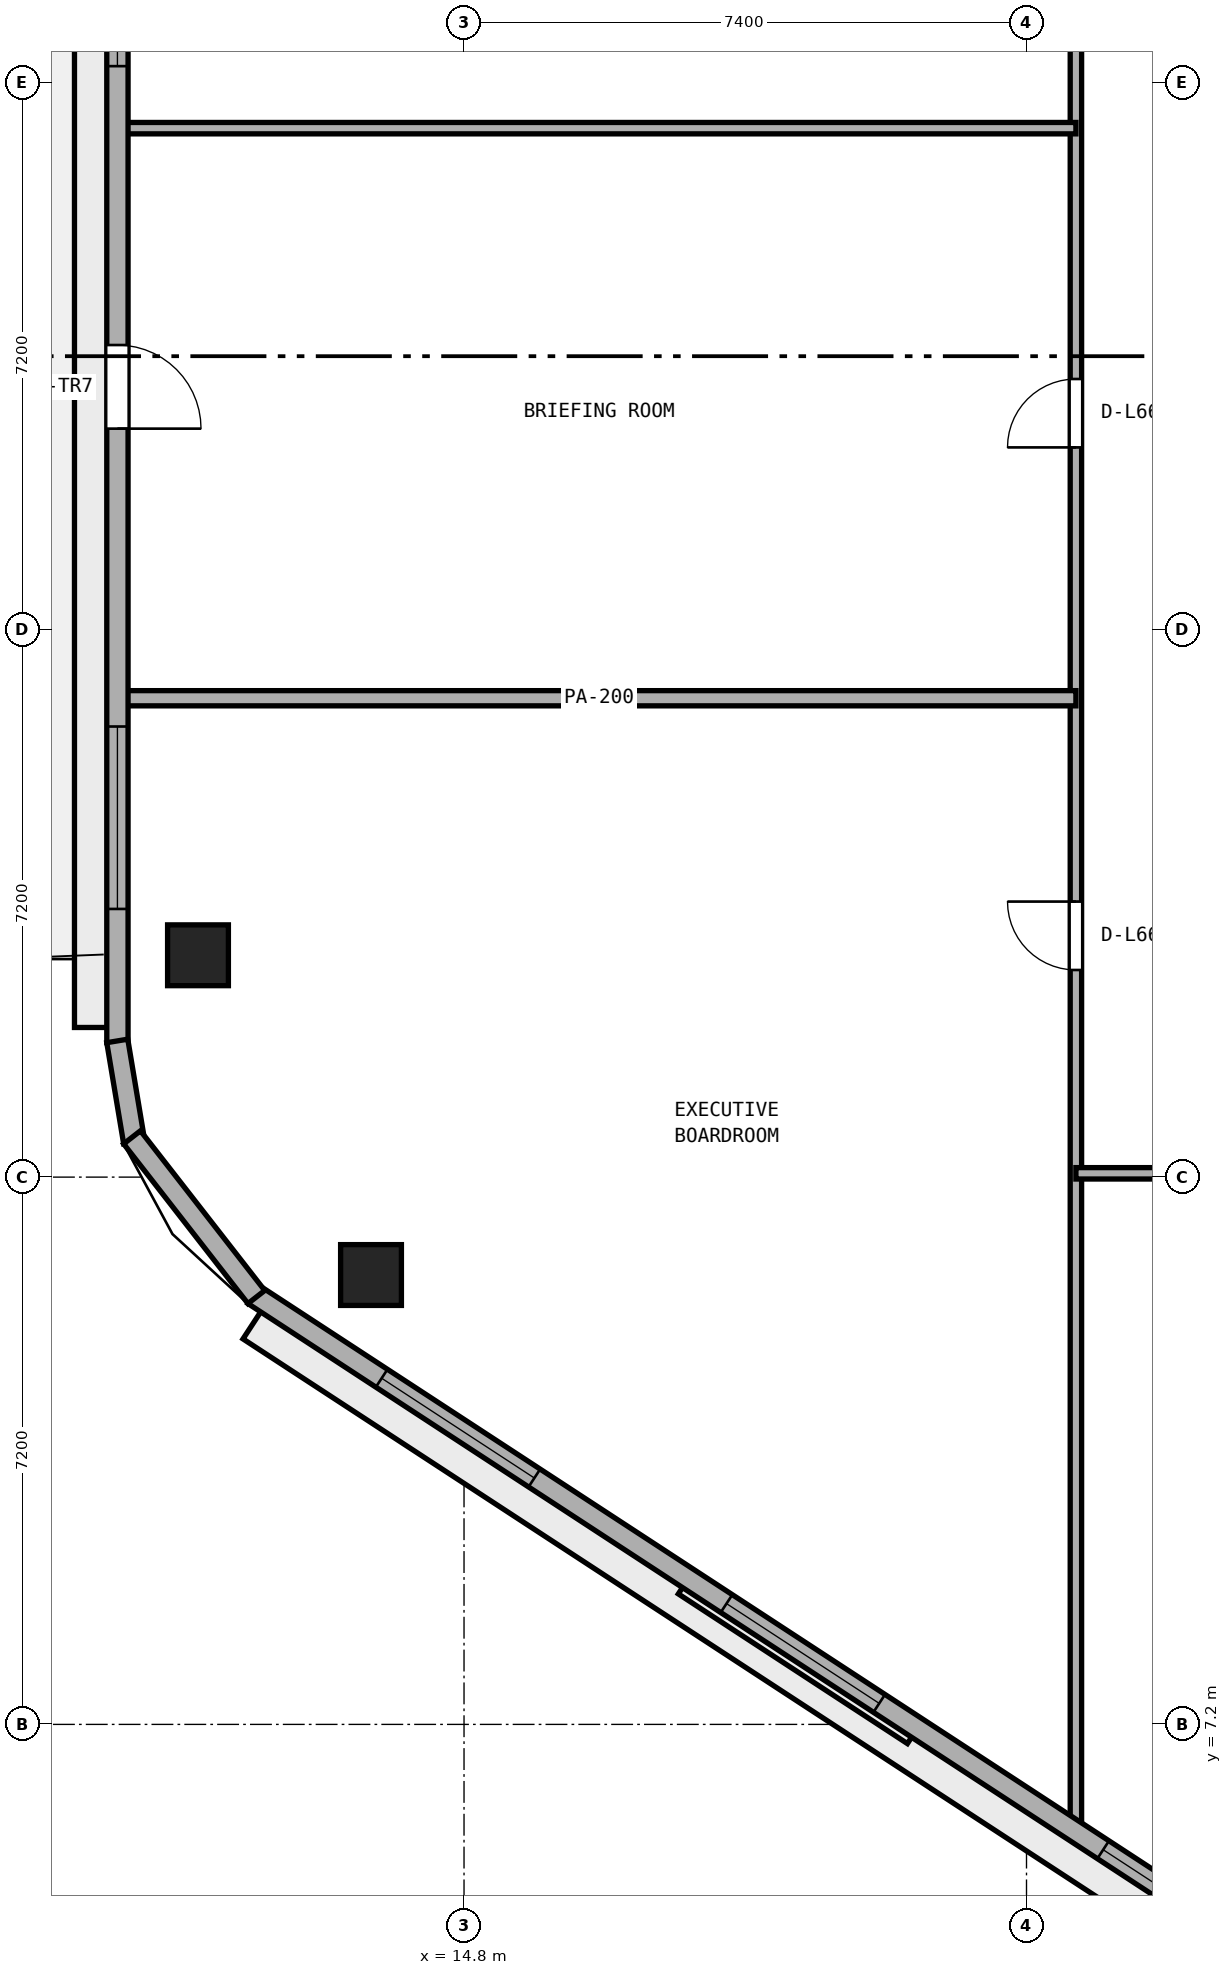
"""IFC4 building model, lengths in metres.
Left out: names, types, materials, properties, quantities, classifications, styles, units other than length and angle.
Written with IfcOpenShell. Run it as: python <this file> out.ifc"""

import sys

from ifc_helpers import new_model, si_unit, direction, frame, frame_2d, origin, origin_2d, place, context, subcontext, project, spatial, rectangle, extrude, element, fill, save


model = new_model("IFC4")
c1 = context("Model", 3, precision=1e-05, world=origin(), true_north=direction((0.0, 1.0)))
c2 = subcontext(c1, "Body", "Model", "MODEL_VIEW")
j1 = project(units=[si_unit("LENGTHUNIT", "METRE"), si_unit("PLANEANGLEUNIT", "RADIAN")], contexts=[c1])
p1 = place(None, origin())
s1 = spatial("IfcSite", under=j1, at=p1, CompositionType="ELEMENT")
p2 = place(p1, origin())
s2 = spatial("IfcBuilding", under=s1, at=p2, CompositionType="ELEMENT")
p3 = place(p2, frame((0.0, 0.0, 259.2)))
s3 = spatial("IfcBuildingStorey", under=s2, at=p3, CompositionType="ELEMENT", Elevation=259.2)
for number, where, z_axis, x_axis in (
    (1, (11.3, 17.319, 0.0), (0.0, 0.0, 1.0), (1.0, 0.0, 0.0)),
    (2, (13.576, 13.112, 0.0), (0.0, 0.0, 1.0), (1.0, 0.0, 0.0)),
):
    element("IfcColumn", number, at=place(p3, frame(where, z_axis=z_axis, x_axis=x_axis)), inside=s3, PredefinedType="COLUMN", context=c2, shape_type="SweptSolid", body=[
        extrude(rectangle(XDim=0.8, YDim=0.8, at=origin_2d()), origin(), (0.0, 0.0, 1.0), 3.8),
    ])
p4 = place(p3, frame((22.85, 5.758, 0.0), z_axis=(0.0, 0.0, 1.0), x_axis=(0.0, 1.0, 0.0)))
e3 = element("IfcWall", 3, at=p4, inside=s3, PredefinedType="PARTITIONING", context=c2, shape_type="SweptSolid", body=[
    extrude(rectangle(XDim=38.65, YDim=0.15, at=frame_2d((19.325, 0.0))), origin(), (0.0, 0.0, 1.0), 3.51),
])
p5 = place(p4, frame((11.367, 0.0, 0.0)))
e4 = element("IfcOpeningElement", 4, at=p5, cuts=e3, PredefinedType="OPENING", context=c2, shape_type="SweptSolid", body=[
    extrude(rectangle(XDim=0.9, YDim=2.1, at=frame_2d((0.45, 1.05))), frame((0.0, 0.085, 0.0), z_axis=(0.0, -1.0, 0.0), x_axis=(1.0, 0.0, 0.0)), (0.0, 0.0, 1.0), 0.17),
])
p6 = place(p4, frame((18.242, 0.0, 0.0)))
e5 = element("IfcOpeningElement", 5, at=p6, cuts=e3, PredefinedType="OPENING", context=c2, shape_type="SweptSolid", body=[
    extrude(rectangle(XDim=0.9, YDim=2.1, at=frame_2d((0.45, 1.05))), frame((0.0, 0.085, 0.0), z_axis=(0.0, -1.0, 0.0), x_axis=(1.0, 0.0, 0.0)), (0.0, 0.0, 1.0), 0.17),
])
p7 = place(p4, frame((25.867, 0.0, 0.0)))
e6 = element("IfcOpeningElement", 6, at=p7, cuts=e3, PredefinedType="OPENING", context=c2, shape_type="SweptSolid", body=[
    extrude(rectangle(XDim=0.9, YDim=2.1, at=frame_2d((0.45, 1.05))), frame((0.0, 0.085, 0.0), z_axis=(0.0, -1.0, 0.0), x_axis=(1.0, 0.0, 0.0)), (0.0, 0.0, 1.0), 0.17),
])
p8 = place(p3, frame((22.85, 14.45, 0.0), z_axis=(0.0, 0.0, 1.0), x_axis=(1.0, 0.0, 0.0)))
e7 = element("IfcWall", 7, at=p8, inside=s3, PredefinedType="PARTITIONING", context=c2, shape_type="SweptSolid", body=[
    extrude(rectangle(XDim=12.8, YDim=0.15, at=frame_2d((6.4, 0.0))), origin(), (0.0, 0.0, 1.0), 3.51),
])
p9 = place(p8, frame((5.9, 0.0, 0.0)))
e8 = element("IfcOpeningElement", 8, at=p9, cuts=e7, PredefinedType="OPENING", context=c2, shape_type="SweptSolid", body=[
    extrude(rectangle(XDim=1.0, YDim=2.12, at=frame_2d((0.5, 1.06))), frame((0.0, 0.085, 0.0), z_axis=(0.0, -1.0, 0.0), x_axis=(1.0, 0.0, 0.0)), (0.0, 0.0, 1.0), 0.17),
])
p10 = place(p3, frame((10.305, 20.7, 0.0), z_axis=(0.0, 0.0, 1.0), x_axis=(1.0, 0.0, 0.0)))
e9 = element("IfcWall", 9, at=p10, inside=s3, PredefinedType="PARTITIONING", context=c2, shape_type="SweptSolid", body=[
    extrude(rectangle(XDim=12.545, YDim=0.2, at=frame_2d((6.272, 0.0))), origin(), (0.0, 0.0, 1.0), 3.51),
])
p11 = place(p3, frame((10.305, 28.2, 0.0), z_axis=(0.0, 0.0, 1.0), x_axis=(1.0, 0.0, 0.0)))
e10 = element("IfcWall", 10, at=p11, inside=s3, PredefinedType="PARTITIONING", context=c2, shape_type="SweptSolid", body=[
    extrude(rectangle(XDim=12.545, YDim=0.15, at=frame_2d((6.272, 0.0))), origin(), (0.0, 0.0, 1.0), 3.51),
])
p12 = place(p3, frame((10.24, 33.425, 0.0), z_axis=(0.0, 0.0, 1.0), x_axis=(0.0, -1.0, 0.0)))
e11 = element("IfcWall", 11, at=p12, inside=s3, PredefinedType="STANDARD", context=c2, shape_type="SweptSolid", body=[
    extrude(rectangle(XDim=17.257, YDim=0.28, at=frame_2d((8.628, 0.0))), origin(), (0.0, 0.0, 1.0), 3.51),
])
p13 = place(p12, frame((8.078, 0.0, 0.0)))
e12 = element("IfcOpeningElement", 12, at=p13, cuts=e11, PredefinedType="OPENING", context=c2, shape_type="SweptSolid", body=[
    extrude(rectangle(XDim=1.1, YDim=2.2, at=frame_2d((0.55, 1.1))), frame((0.0, 0.15, 0.0), z_axis=(0.0, -1.0, 0.0), x_axis=(1.0, 0.0, 0.0)), (0.0, 0.0, 1.0), 0.3),
])
p14 = place(p12, frame((2.01, 0.0, 0.9)))
e13 = element("IfcOpeningElement", 13, at=p14, cuts=e11, PredefinedType="OPENING", context=c2, shape_type="SweptSolid", body=[
    extrude(rectangle(XDim=2.4, YDim=1.75, at=frame_2d((1.2, 0.875))), frame((0.0, 0.15, 0.0), z_axis=(0.0, -1.0, 0.0), x_axis=(1.0, 0.0, 0.0)), (0.0, 0.0, 1.0), 0.3),
])
p15 = place(p12, frame((13.097, 0.0, 0.9)))
e14 = element("IfcOpeningElement", 14, at=p15, cuts=e11, PredefinedType="OPENING", context=c2, shape_type="SweptSolid", body=[
    extrude(rectangle(XDim=2.4, YDim=1.75, at=frame_2d((1.2, 0.875))), frame((0.0, 0.15, 0.0), z_axis=(0.0, -1.0, 0.0), x_axis=(1.0, 0.0, 0.0)), (0.0, 0.0, 1.0), 0.3),
])
p16 = place(p3, frame((12.034, 12.854, 0.0), z_axis=(0.0, 0.0, 1.0), x_axis=(0.837118352984, -0.547021812269, 0.0)))
e15 = element("IfcWall", 15, at=p16, inside=s3, PredefinedType="STANDARD", context=c2, shape_type="SweptSolid", body=[
    extrude(rectangle(XDim=17.259, YDim=0.28, at=frame_2d((8.63, 0.0))), origin(), (0.0, 0.0, 1.0), 3.51),
])
p17 = place(p16, frame((2.01, 0.0, 0.9)))
e16 = element("IfcOpeningElement", 16, at=p17, cuts=e15, PredefinedType="OPENING", context=c2, shape_type="SweptSolid", body=[
    extrude(rectangle(XDim=2.4, YDim=1.75, at=frame_2d((1.2, 0.875))), frame((0.0, 0.15, 0.0), z_axis=(0.0, -1.0, 0.0), x_axis=(1.0, 0.0, 0.0)), (0.0, 0.0, 1.0), 0.3),
])
p18 = place(p16, frame((7.43, 0.0, 0.9)))
e17 = element("IfcOpeningElement", 17, at=p18, cuts=e15, PredefinedType="OPENING", context=c2, shape_type="SweptSolid", body=[
    extrude(rectangle(XDim=2.4, YDim=1.75, at=frame_2d((1.2, 0.875))), frame((0.0, 0.15, 0.0), z_axis=(0.0, -1.0, 0.0), x_axis=(1.0, 0.0, 0.0)), (0.0, 0.0, 1.0), 0.3),
])
p19 = place(p16, frame((13.349, 0.0, 0.9)))
e18 = element("IfcOpeningElement", 18, at=p19, cuts=e15, PredefinedType="OPENING", context=c2, shape_type="SweptSolid", body=[
    extrude(rectangle(XDim=2.4, YDim=1.75, at=frame_2d((1.2, 0.875))), frame((0.0, 0.15, 0.0), z_axis=(0.0, -1.0, 0.0), x_axis=(1.0, 0.0, 0.0)), (0.0, 0.0, 1.0), 0.3),
])
p20 = place(p3, frame((10.238, 16.192, 0.0), z_axis=(0.0, 0.0, 1.0), x_axis=(0.164604311367, -0.986359681191, 0.0)))
e19 = element("IfcWall", 19, at=p20, inside=s3, PredefinedType="STANDARD", context=c2, shape_type="SweptSolid", body=[
    extrude(rectangle(XDim=1.35, YDim=0.28, at=frame_2d((0.675, 0.0))), origin(), (0.0, 0.0, 1.0), 3.51),
])
p21 = place(p3, frame((10.433, 14.923, 0.0), z_axis=(0.0, 0.0, 1.0), x_axis=(0.614181852676, -0.78916452774, 0.0)))
e20 = element("IfcWall", 20, at=p21, inside=s3, PredefinedType="STANDARD", context=c2, shape_type="SweptSolid", body=[
    extrude(rectangle(XDim=2.662, YDim=0.28, at=frame_2d((1.331, 0.0))), origin(), (0.0, 0.0, 1.0), 3.51),
])
p22 = place(p5, origin())
e21 = element("IfcDoor", 21, at=p22, inside=s3, OperationType="SINGLE_SWING_RIGHT", PredefinedType="DOOR", context=c2, shape_type="SweptSolid", body=[
    extrude(rectangle(XDim=0.9, YDim=2.1, at=frame_2d((0.45, 1.05))), frame((0.0, 0.025, 0.0), z_axis=(0.0, -1.0, 0.0), x_axis=(1.0, 0.0, 0.0)), (0.0, 0.0, 1.0), 0.05),
])
fill(e4, e21)
p23 = place(p6, origin())
e22 = element("IfcDoor", 22, at=p23, inside=s3, OperationType="SINGLE_SWING_LEFT", PredefinedType="DOOR", context=c2, shape_type="SweptSolid", body=[
    extrude(rectangle(XDim=0.9, YDim=2.1, at=frame_2d((0.45, 1.05))), frame((0.0, 0.025, 0.0), z_axis=(0.0, -1.0, 0.0), x_axis=(1.0, 0.0, 0.0)), (0.0, 0.0, 1.0), 0.05),
])
fill(e5, e22)
p24 = place(p13, origin())
e23 = element("IfcDoor", 23, at=p24, inside=s3, OperationType="SINGLE_SWING_RIGHT", PredefinedType="DOOR", context=c2, shape_type="SweptSolid", body=[
    extrude(rectangle(XDim=1.1, YDim=2.2, at=frame_2d((0.55, 1.1))), frame((0.0, 0.025, 0.0), z_axis=(0.0, -1.0, 0.0), x_axis=(1.0, 0.0, 0.0)), (0.0, 0.0, 1.0), 0.05),
])
fill(e12, e23)
p25 = place(p14, origin())
e24 = element("IfcWindow", 24, at=p25, inside=s3, PartitioningType="SINGLE_PANEL", PredefinedType="WINDOW", context=c2, shape_type="SweptSolid", body=[
    extrude(rectangle(XDim=2.4, YDim=1.75, at=frame_2d((1.2, 0.875))), frame((0.0, 0.03, 0.0), z_axis=(0.0, -1.0, 0.0), x_axis=(1.0, 0.0, 0.0)), (0.0, 0.0, 1.0), 0.06),
])
fill(e13, e24)
p26 = place(p15, origin())
e25 = element("IfcWindow", 25, at=p26, inside=s3, PartitioningType="SINGLE_PANEL", PredefinedType="WINDOW", context=c2, shape_type="SweptSolid", body=[
    extrude(rectangle(XDim=2.4, YDim=1.75, at=frame_2d((1.2, 0.875))), frame((0.0, 0.03, 0.0), z_axis=(0.0, -1.0, 0.0), x_axis=(1.0, 0.0, 0.0)), (0.0, 0.0, 1.0), 0.06),
])
fill(e14, e25)
p27 = place(p17, origin())
e26 = element("IfcWindow", 26, at=p27, inside=s3, PartitioningType="SINGLE_PANEL", PredefinedType="WINDOW", context=c2, shape_type="SweptSolid", body=[
    extrude(rectangle(XDim=2.4, YDim=1.75, at=frame_2d((1.2, 0.875))), frame((0.0, 0.03, 0.0), z_axis=(0.0, -1.0, 0.0), x_axis=(1.0, 0.0, 0.0)), (0.0, 0.0, 1.0), 0.06),
])
fill(e16, e26)
p28 = place(p18, origin())
e27 = element("IfcWindow", 27, at=p28, inside=s3, PartitioningType="SINGLE_PANEL", PredefinedType="WINDOW", context=c2, shape_type="SweptSolid", body=[
    extrude(rectangle(XDim=2.4, YDim=1.75, at=frame_2d((1.2, 0.875))), frame((0.0, 0.03, 0.0), z_axis=(0.0, -1.0, 0.0), x_axis=(1.0, 0.0, 0.0)), (0.0, 0.0, 1.0), 0.06),
])
fill(e17, e27)
p29 = place(p19, origin())
e28 = element("IfcWindow", 28, at=p29, inside=s3, PartitioningType="SINGLE_PANEL", PredefinedType="WINDOW", context=c2, shape_type="SweptSolid", body=[
    extrude(rectangle(XDim=2.4, YDim=1.75, at=frame_2d((1.2, 0.875))), frame((0.0, 0.03, 0.0), z_axis=(0.0, -1.0, 0.0), x_axis=(1.0, 0.0, 0.0)), (0.0, 0.0, 1.0), 0.06),
])
fill(e18, e28)
save(model, sys.argv[1])
